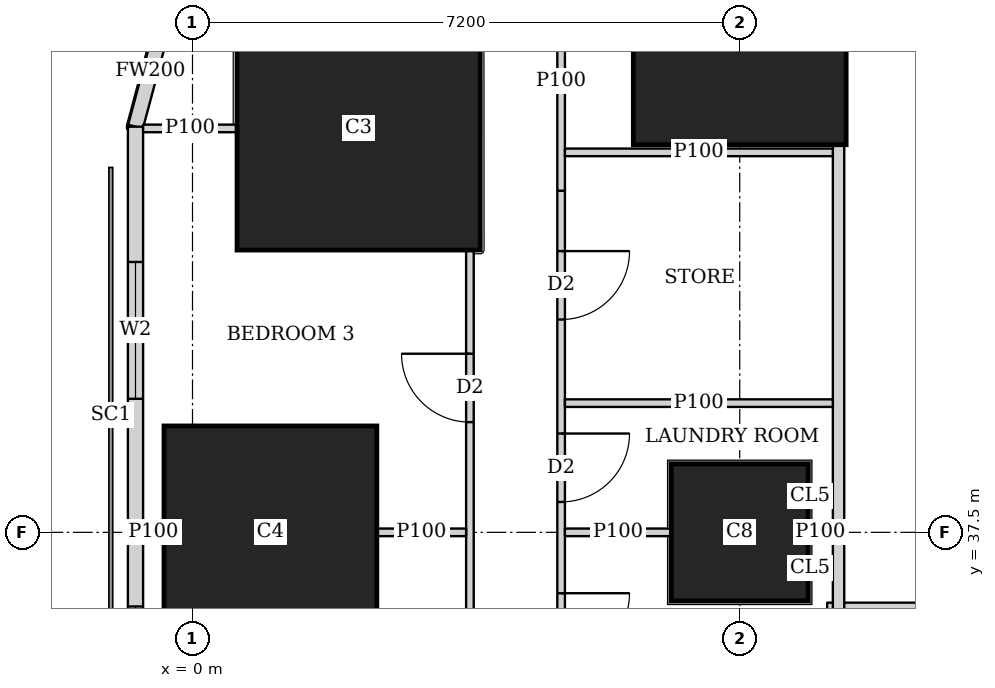
"""IFC4 building model, lengths in metres.
Left out: names, types, materials, properties, quantities, classifications, styles, units other than length and angle.
Written with IfcOpenShell. Run it as: python <this file> out.ifc"""

import sys

from ifc_helpers import new_model, si_unit, direction, frame, frame_2d, origin, origin_2d, place, context, subcontext, project, spatial, rectangle, extrude, element, fill, save


model = new_model("IFC4")
c1 = context("Model", 3, precision=1e-05, world=origin(), true_north=direction((0.0, 1.0)))
c2 = subcontext(c1, "Body", "Model", "MODEL_VIEW")
j1 = project(units=[si_unit("LENGTHUNIT", "METRE"), si_unit("PLANEANGLEUNIT", "RADIAN")], contexts=[c1])
p1 = place(None, origin())
s1 = spatial("IfcSite", under=j1, at=p1, CompositionType="ELEMENT")
p2 = place(p1, origin())
s2 = spatial("IfcBuilding", under=s1, at=p2, CompositionType="ELEMENT")
p3 = place(p2, frame((0.0, 0.0, 65.0)))
s3 = spatial("IfcBuildingStorey", under=s2, at=p3, CompositionType="ELEMENT", Elevation=65.0)
p4 = place(p3, frame((1.025, 37.5, 0.0), z_axis=(0.0, 0.0, 1.0), x_axis=(1.0, 0.0, 0.0)))
e1 = element("IfcColumn", 1, at=p4, inside=s3, PredefinedType="COLUMN", context=c2, shape_type="SweptSolid", body=[
    extrude(rectangle(XDim=2.8, YDim=2.8, at=origin_2d()), origin(), (0.0, 0.0, 1.0), 3.75),
])
p5 = place(p3, frame((7.2, 37.5, 0.0), z_axis=(0.0, 0.0, 1.0), x_axis=(1.0, 0.0, 0.0)))
e2 = element("IfcColumn", 2, at=p5, inside=s3, PredefinedType="COLUMN", context=c2, shape_type="SweptSolid", body=[
    extrude(rectangle(XDim=1.8, YDim=1.8, at=origin_2d()), origin(), (0.0, 0.0, 1.0), 3.75),
])
p6 = place(p3, frame((2.186, 42.814, 0.0), z_axis=(0.0, 0.0, 1.0), x_axis=(1.0, 0.0, 0.0)))
e3 = element("IfcColumn", 3, at=p6, inside=s3, PredefinedType="COLUMN", context=c2, shape_type="SweptSolid", body=[
    extrude(rectangle(XDim=3.2, YDim=3.2, at=origin_2d()), origin(), (0.0, 0.0, 1.0), 3.75),
])
p7 = place(p3, frame((7.2, 44.0, 0.0), z_axis=(0.0, 0.0, 1.0), x_axis=(1.0, 0.0, 0.0)))
e4 = element("IfcColumn", 4, at=p7, inside=s3, PredefinedType="COLUMN", context=c2, shape_type="SweptSolid", body=[
    extrude(rectangle(XDim=2.8, YDim=2.8, at=origin_2d()), origin(), (0.0, 0.0, 1.0), 3.75),
])
p8 = place(p3, frame((-0.358, 44.298, 0.0), z_axis=(0.0, 0.0, 1.0), x_axis=(-0.259168954497, -0.965832000415, 0.0)))
e5 = element("IfcWall", 5, at=p8, inside=s3, PredefinedType="SOLIDWALL", context=c2, shape_type="SweptSolid", body=[
    extrude(rectangle(XDim=1.513, YDim=0.2, at=frame_2d((0.756, 0.0))), origin(), (0.0, 0.0, 1.0), 3.5),
])
p9 = place(p3, frame((-0.75, 42.837, 0.0), z_axis=(0.0, 0.0, 1.0), x_axis=(0.0, -1.0, 0.0)))
e6 = element("IfcWall", 6, at=p9, inside=s3, PredefinedType="SOLIDWALL", context=c2, shape_type="SweptSolid", body=[
    extrude(rectangle(XDim=40.674, YDim=0.2, at=frame_2d((20.337, 0.0))), origin(), (0.0, 0.0, 1.0), 3.5),
])
p10 = place(p9, frame((1.78, 0.0, 0.9)))
e7 = element("IfcOpeningElement", 7, at=p10, cuts=e6, PredefinedType="OPENING", context=c2, shape_type="SweptSolid", body=[
    extrude(rectangle(XDim=1.8, YDim=1.5, at=frame_2d((0.9, 0.75))), frame((0.0, 0.11, 0.0), z_axis=(0.0, -1.0, 0.0), x_axis=(1.0, 0.0, 0.0)), (0.0, 0.0, 1.0), 0.22),
])
p11 = place(p9, frame((6.312, 0.0, 0.9)))
e8 = element("IfcOpeningElement", 8, at=p11, cuts=e6, PredefinedType="OPENING", context=c2, shape_type="SweptSolid", body=[
    extrude(rectangle(XDim=1.8, YDim=1.5, at=frame_2d((0.9, 0.75))), frame((0.0, 0.11, 0.0), z_axis=(0.0, -1.0, 0.0), x_axis=(1.0, 0.0, 0.0)), (0.0, 0.0, 1.0), 0.22),
])
p12 = place(p9, frame((10.062, 0.0, 0.9)))
e9 = element("IfcOpeningElement", 9, at=p12, cuts=e6, PredefinedType="OPENING", context=c2, shape_type="SweptSolid", body=[
    extrude(rectangle(XDim=1.8, YDim=1.5, at=frame_2d((0.9, 0.75))), frame((0.0, 0.11, 0.0), z_axis=(0.0, -1.0, 0.0), x_axis=(1.0, 0.0, 0.0)), (0.0, 0.0, 1.0), 0.22),
])
p13 = place(p9, frame((13.812, 0.0, 0.9)))
e10 = element("IfcOpeningElement", 10, at=p13, cuts=e6, PredefinedType="OPENING", context=c2, shape_type="SweptSolid", body=[
    extrude(rectangle(XDim=1.8, YDim=1.5, at=frame_2d((0.9, 0.75))), frame((0.0, 0.11, 0.0), z_axis=(0.0, -1.0, 0.0), x_axis=(1.0, 0.0, 0.0)), (0.0, 0.0, 1.0), 0.22),
])
p14 = place(p9, frame((17.562, 0.0, 0.9)))
e11 = element("IfcOpeningElement", 11, at=p14, cuts=e6, PredefinedType="OPENING", context=c2, shape_type="SweptSolid", body=[
    extrude(rectangle(XDim=1.8, YDim=1.5, at=frame_2d((0.9, 0.75))), frame((0.0, 0.11, 0.0), z_axis=(0.0, -1.0, 0.0), x_axis=(1.0, 0.0, 0.0)), (0.0, 0.0, 1.0), 0.22),
])
p15 = place(p9, frame((21.312, 0.0, 0.9)))
e12 = element("IfcOpeningElement", 12, at=p15, cuts=e6, PredefinedType="OPENING", context=c2, shape_type="SweptSolid", body=[
    extrude(rectangle(XDim=1.8, YDim=1.5, at=frame_2d((0.9, 0.75))), frame((0.0, 0.11, 0.0), z_axis=(0.0, -1.0, 0.0), x_axis=(1.0, 0.0, 0.0)), (0.0, 0.0, 1.0), 0.22),
])
p16 = place(p9, frame((25.062, 0.0, 0.9)))
e13 = element("IfcOpeningElement", 13, at=p16, cuts=e6, PredefinedType="OPENING", context=c2, shape_type="SweptSolid", body=[
    extrude(rectangle(XDim=1.8, YDim=1.5, at=frame_2d((0.9, 0.75))), frame((0.0, 0.11, 0.0), z_axis=(0.0, -1.0, 0.0), x_axis=(1.0, 0.0, 0.0)), (0.0, 0.0, 1.0), 0.22),
])
p17 = place(p9, frame((28.812, 0.0, 0.9)))
e14 = element("IfcOpeningElement", 14, at=p17, cuts=e6, PredefinedType="OPENING", context=c2, shape_type="SweptSolid", body=[
    extrude(rectangle(XDim=1.8, YDim=1.5, at=frame_2d((0.9, 0.75))), frame((0.0, 0.11, 0.0), z_axis=(0.0, -1.0, 0.0), x_axis=(1.0, 0.0, 0.0)), (0.0, 0.0, 1.0), 0.22),
])
p18 = place(p9, frame((32.562, 0.0, 0.9)))
e15 = element("IfcOpeningElement", 15, at=p18, cuts=e6, PredefinedType="OPENING", context=c2, shape_type="SweptSolid", body=[
    extrude(rectangle(XDim=1.8, YDim=1.5, at=frame_2d((0.9, 0.75))), frame((0.0, 0.11, 0.0), z_axis=(0.0, -1.0, 0.0), x_axis=(1.0, 0.0, 0.0)), (0.0, 0.0, 1.0), 0.22),
])
p19 = place(p9, frame((37.094, 0.0, 0.9)))
e16 = element("IfcOpeningElement", 16, at=p19, cuts=e6, PredefinedType="OPENING", context=c2, shape_type="SweptSolid", body=[
    extrude(rectangle(XDim=1.8, YDim=1.5, at=frame_2d((0.9, 0.75))), frame((0.0, 0.11, 0.0), z_axis=(0.0, -1.0, 0.0), x_axis=(1.0, 0.0, 0.0)), (0.0, 0.0, 1.0), 0.22),
])
p20 = place(p3, frame((8.5, 2.426, 0.0), z_axis=(0.0, 0.0, 1.0), x_axis=(0.0, 1.0, 0.0)))
e17 = element("IfcWall", 17, at=p20, inside=s3, PredefinedType="SOLIDWALL", context=c2, shape_type="SweptSolid", body=[
    extrude(rectangle(XDim=40.173, YDim=0.15, at=frame_2d((20.086, 0.0))), origin(), (0.0, 0.0, 1.0), 3.5),
])
p21 = place(p20, frame((6.661, 0.0, 0.0)))
e18 = element("IfcOpeningElement", 18, at=p21, cuts=e17, PredefinedType="OPENING", context=c2, shape_type="SweptSolid", body=[
    extrude(rectangle(XDim=1.0, YDim=2.1, at=frame_2d((0.5, 1.05))), frame((0.0, 0.085, 0.0), z_axis=(0.0, -1.0, 0.0), x_axis=(1.0, 0.0, 0.0)), (0.0, 0.0, 1.0), 0.17),
])
p22 = place(p20, frame((9.986, 0.0, 0.0)))
e19 = element("IfcOpeningElement", 19, at=p22, cuts=e17, PredefinedType="OPENING", context=c2, shape_type="SweptSolid", body=[
    extrude(rectangle(XDim=1.0, YDim=2.1, at=frame_2d((0.5, 1.05))), frame((0.0, 0.085, 0.0), z_axis=(0.0, -1.0, 0.0), x_axis=(1.0, 0.0, 0.0)), (0.0, 0.0, 1.0), 0.17),
])
p23 = place(p20, frame((17.487, 0.0, 0.0)))
e20 = element("IfcOpeningElement", 20, at=p23, cuts=e17, PredefinedType="OPENING", context=c2, shape_type="SweptSolid", body=[
    extrude(rectangle(XDim=1.0, YDim=2.1, at=frame_2d((0.5, 1.05))), frame((0.0, 0.085, 0.0), z_axis=(0.0, -1.0, 0.0), x_axis=(1.0, 0.0, 0.0)), (0.0, 0.0, 1.0), 0.17),
])
p24 = place(p20, frame((24.987, 0.0, 0.0)))
e21 = element("IfcOpeningElement", 21, at=p24, cuts=e17, PredefinedType="OPENING", context=c2, shape_type="SweptSolid", body=[
    extrude(rectangle(XDim=1.0, YDim=2.1, at=frame_2d((0.5, 1.05))), frame((0.0, 0.085, 0.0), z_axis=(0.0, -1.0, 0.0), x_axis=(1.0, 0.0, 0.0)), (0.0, 0.0, 1.0), 0.17),
])
p25 = place(p3, frame((8.35, 36.5, 0.0), z_axis=(0.0, 0.0, 1.0), x_axis=(1.0, 0.0, 0.0)))
e22 = element("IfcWall", 22, at=p25, inside=s3, PredefinedType="SOLIDWALL", context=c2, shape_type="SweptSolid", body=[
    extrude(rectangle(XDim=26.415, YDim=0.15, at=frame_2d((13.208, 0.0))), origin(), (0.0, 0.0, 1.0), 3.5),
])
p26 = place(p25, frame((2.6, 0.0, 0.0)))
e23 = element("IfcOpeningElement", 23, at=p26, cuts=e22, PredefinedType="OPENING", context=c2, shape_type="SweptSolid", body=[
    extrude(rectangle(XDim=1.0, YDim=2.1, at=frame_2d((0.5, 1.05))), frame((0.0, 0.085, 0.0), z_axis=(0.0, -1.0, 0.0), x_axis=(1.0, 0.0, 0.0)), (0.0, 0.0, 1.0), 0.17),
])
p27 = place(p25, frame((10.949, 0.0, 0.0)))
e24 = element("IfcOpeningElement", 24, at=p27, cuts=e22, PredefinedType="OPENING", context=c2, shape_type="SweptSolid", body=[
    extrude(rectangle(XDim=1.0, YDim=2.1, at=frame_2d((0.5, 1.05))), frame((0.0, 0.085, 0.0), z_axis=(0.0, -1.0, 0.0), x_axis=(1.0, 0.0, 0.0)), (0.0, 0.0, 1.0), 0.17),
])
p28 = place(p25, frame((18.149, 0.0, 0.0)))
e25 = element("IfcOpeningElement", 25, at=p28, cuts=e22, PredefinedType="OPENING", context=c2, shape_type="SweptSolid", body=[
    extrude(rectangle(XDim=1.0, YDim=2.1, at=frame_2d((0.5, 1.05))), frame((0.0, 0.085, 0.0), z_axis=(0.0, -1.0, 0.0), x_axis=(1.0, 0.0, 0.0)), (0.0, 0.0, 1.0), 0.17),
])
p29 = place(p3, frame((3.65, 30.0, 0.0), z_axis=(0.0, 0.0, 1.0), x_axis=(0.0, 1.0, 0.0)))
e26 = element("IfcWall", 26, at=p29, inside=s3, PredefinedType="PARTITIONING", context=c2, shape_type="SweptSolid", body=[
    extrude(rectangle(XDim=11.213, YDim=0.1, at=frame_2d((5.606, 0.0))), origin(), (0.0, 0.0, 1.0), 3.5),
])
p30 = place(p29, frame((1.45, 0.0, 0.0)))
e27 = element("IfcOpeningElement", 27, at=p30, cuts=e26, PredefinedType="OPENING", context=c2, shape_type="SweptSolid", body=[
    extrude(rectangle(XDim=0.9, YDim=2.1, at=frame_2d((0.45, 1.05))), frame((0.0, 0.06, 0.0), z_axis=(0.0, -1.0, 0.0), x_axis=(1.0, 0.0, 0.0)), (0.0, 0.0, 1.0), 0.12),
])
p31 = place(p29, frame((3.95, 0.0, 0.0)))
e28 = element("IfcOpeningElement", 28, at=p31, cuts=e26, PredefinedType="OPENING", context=c2, shape_type="SweptSolid", body=[
    extrude(rectangle(XDim=0.9, YDim=2.1, at=frame_2d((0.45, 1.05))), frame((0.0, 0.06, 0.0), z_axis=(0.0, -1.0, 0.0), x_axis=(1.0, 0.0, 0.0)), (0.0, 0.0, 1.0), 0.12),
])
p32 = place(p29, frame((8.95, 0.0, 0.0)))
e29 = element("IfcOpeningElement", 29, at=p32, cuts=e26, PredefinedType="OPENING", context=c2, shape_type="SweptSolid", body=[
    extrude(rectangle(XDim=0.9, YDim=2.1, at=frame_2d((0.45, 1.05))), frame((0.0, 0.06, 0.0), z_axis=(0.0, -1.0, 0.0), x_axis=(1.0, 0.0, 0.0)), (0.0, 0.0, 1.0), 0.12),
])
p33 = place(p3, frame((4.85, 30.0, 0.0), z_axis=(0.0, 0.0, 1.0), x_axis=(0.0, 1.0, 0.0)))
e30 = element("IfcWall", 30, at=p33, inside=s3, PredefinedType="PARTITIONING", context=c2, shape_type="SweptSolid", body=[
    extrude(rectangle(XDim=11.994, YDim=0.1, at=frame_2d((5.997, 0.0))), origin(), (0.0, 0.0, 1.0), 3.5),
])
p34 = place(p33, frame((0.575, 0.0, 0.0)))
e31 = element("IfcOpeningElement", 31, at=p34, cuts=e30, PredefinedType="OPENING", context=c2, shape_type="SweptSolid", body=[
    extrude(rectangle(XDim=0.9, YDim=2.1, at=frame_2d((0.45, 1.05))), frame((0.0, 0.06, 0.0), z_axis=(0.0, -1.0, 0.0), x_axis=(1.0, 0.0, 0.0)), (0.0, 0.0, 1.0), 0.12),
])
p35 = place(p33, frame((5.799, 0.0, 0.0)))
e32 = element("IfcOpeningElement", 32, at=p35, cuts=e30, PredefinedType="OPENING", context=c2, shape_type="SweptSolid", body=[
    extrude(rectangle(XDim=0.9, YDim=2.1, at=frame_2d((0.45, 1.05))), frame((0.0, 0.06, 0.0), z_axis=(0.0, -1.0, 0.0), x_axis=(1.0, 0.0, 0.0)), (0.0, 0.0, 1.0), 0.12),
])
p36 = place(p33, frame((7.9, 0.0, 0.0)))
e33 = element("IfcOpeningElement", 33, at=p36, cuts=e30, PredefinedType="OPENING", context=c2, shape_type="SweptSolid", body=[
    extrude(rectangle(XDim=0.9, YDim=2.1, at=frame_2d((0.45, 1.05))), frame((0.0, 0.06, 0.0), z_axis=(0.0, -1.0, 0.0), x_axis=(1.0, 0.0, 0.0)), (0.0, 0.0, 1.0), 0.12),
])
p37 = place(p33, frame((3.075, 0.0, 0.0)))
e34 = element("IfcOpeningElement", 34, at=p37, cuts=e30, PredefinedType="OPENING", context=c2, shape_type="SweptSolid", body=[
    extrude(rectangle(XDim=0.9, YDim=2.1, at=frame_2d((0.45, 1.05))), frame((0.0, 0.06, 0.0), z_axis=(0.0, -1.0, 0.0), x_axis=(1.0, 0.0, 0.0)), (0.0, 0.0, 1.0), 0.12),
])
p38 = place(p33, frame((10.3, 0.0, 0.0)))
e35 = element("IfcOpeningElement", 35, at=p38, cuts=e30, PredefinedType="OPENING", context=c2, shape_type="SweptSolid", body=[
    extrude(rectangle(XDim=0.9, YDim=2.1, at=frame_2d((0.45, 1.05))), frame((0.0, 0.06, 0.0), z_axis=(0.0, -1.0, 0.0), x_axis=(1.0, 0.0, 0.0)), (0.0, 0.0, 1.0), 0.12),
])
p39 = place(p3, frame((4.85, 41.994, 0.0), z_axis=(0.0, 0.0, 1.0), x_axis=(0.0, 1.0, 0.0)))
e36 = element("IfcWall", 36, at=p39, inside=s3, PredefinedType="PARTITIONING", context=c2, shape_type="SweptSolid", body=[
    extrude(rectangle(XDim=2.901, YDim=0.1, at=frame_2d((1.451, 0.0))), origin(), (0.0, 0.0, 1.0), 2.05),
])
p40 = place(p3, frame((-0.65, 37.5, 0.0), z_axis=(0.0, 0.0, 1.0), x_axis=(1.0, 0.0, 0.0)))
e37 = element("IfcWall", 37, at=p40, inside=s3, PredefinedType="PARTITIONING", context=c2, shape_type="SweptSolid", body=[
    extrude(rectangle(XDim=0.274, YDim=0.1, at=frame_2d((0.137, 0.0))), origin(), (0.0, 0.0, 1.0), 3.5),
])
p41 = place(p3, frame((2.426, 37.5, 0.0), z_axis=(0.0, 0.0, 1.0), x_axis=(1.0, 0.0, 0.0)))
e38 = element("IfcWall", 38, at=p41, inside=s3, PredefinedType="PARTITIONING", context=c2, shape_type="SweptSolid", body=[
    extrude(rectangle(XDim=1.174, YDim=0.1, at=frame_2d((0.587, 0.0))), origin(), (0.0, 0.0, 1.0), 2.05),
])
p42 = place(p3, frame((-0.65, 42.814, 0.0), z_axis=(0.0, 0.0, 1.0), x_axis=(1.0, 0.0, 0.0)))
e39 = element("IfcWall", 39, at=p42, inside=s3, PredefinedType="PARTITIONING", context=c2, shape_type="SweptSolid", body=[
    extrude(rectangle(XDim=1.235, YDim=0.1, at=frame_2d((0.617, 0.0))), origin(), (0.0, 0.0, 1.0), 3.5),
])
p43 = place(p3, frame((4.9, 37.5, 0.0), z_axis=(0.0, 0.0, 1.0), x_axis=(1.0, 0.0, 0.0)))
e40 = element("IfcWall", 40, at=p43, inside=s3, PredefinedType="PARTITIONING", context=c2, shape_type="SweptSolid", body=[
    extrude(rectangle(XDim=1.399, YDim=0.1, at=frame_2d((0.7, 0.0))), origin(), (0.0, 0.0, 1.0), 3.5),
])
p44 = place(p3, frame((8.101, 37.5, 0.0), z_axis=(0.0, 0.0, 1.0), x_axis=(1.0, 0.0, 0.0)))
e41 = element("IfcWall", 41, at=p44, inside=s3, PredefinedType="PARTITIONING", context=c2, shape_type="SweptSolid", body=[
    extrude(rectangle(XDim=0.324, YDim=0.1, at=frame_2d((0.162, 0.0))), origin(), (0.0, 0.0, 1.0), 3.5),
])
p45 = place(p3, frame((4.9, 42.499, 0.0), z_axis=(0.0, 0.0, 1.0), x_axis=(1.0, 0.0, 0.0)))
e42 = element("IfcWall", 42, at=p45, inside=s3, PredefinedType="PARTITIONING", context=c2, shape_type="SweptSolid", body=[
    extrude(rectangle(XDim=3.525, YDim=0.1, at=frame_2d((1.763, 0.0))), origin(), (0.0, 0.0, 1.0), 2.05),
])
p46 = place(p3, frame((4.9, 39.2, 0.0), z_axis=(0.0, 0.0, 1.0), x_axis=(1.0, 0.0, 0.0)))
e43 = element("IfcWall", 43, at=p46, inside=s3, PredefinedType="PARTITIONING", context=c2, shape_type="SweptSolid", body=[
    extrude(rectangle(XDim=3.525, YDim=0.1, at=frame_2d((1.763, 0.0))), origin(), (0.0, 0.0, 1.0), 3.5),
])
p47 = place(p10, origin())
e44 = element("IfcWindow", 44, at=p47, inside=s3, PartitioningType="SINGLE_PANEL", PredefinedType="WINDOW", context=c2, shape_type="SweptSolid", body=[
    extrude(rectangle(XDim=1.8, YDim=1.5, at=frame_2d((0.9, 0.75))), frame((0.0, 0.03, 0.0), z_axis=(0.0, -1.0, 0.0), x_axis=(1.0, 0.0, 0.0)), (0.0, 0.0, 1.0), 0.06),
])
fill(e7, e44)
p48 = place(p11, origin())
e45 = element("IfcWindow", 45, at=p48, inside=s3, PartitioningType="SINGLE_PANEL", PredefinedType="WINDOW", context=c2, shape_type="SweptSolid", body=[
    extrude(rectangle(XDim=1.8, YDim=1.5, at=frame_2d((0.9, 0.75))), frame((0.0, 0.03, 0.0), z_axis=(0.0, -1.0, 0.0), x_axis=(1.0, 0.0, 0.0)), (0.0, 0.0, 1.0), 0.06),
])
fill(e8, e45)
p49 = place(p32, origin())
e46 = element("IfcDoor", 46, at=p49, inside=s3, OperationType="SINGLE_SWING_RIGHT", PredefinedType="DOOR", context=c2, shape_type="SweptSolid", body=[
    extrude(rectangle(XDim=0.9, YDim=2.1, at=frame_2d((0.45, 1.05))), frame((0.0, 0.025, 0.0), z_axis=(0.0, -1.0, 0.0), x_axis=(1.0, 0.0, 0.0)), (0.0, 0.0, 1.0), 0.05),
])
fill(e29, e46)
p50 = place(p35, origin())
e47 = element("IfcDoor", 47, at=p50, inside=s3, OperationType="SINGLE_SWING_LEFT", PredefinedType="DOOR", context=c2, shape_type="SweptSolid", body=[
    extrude(rectangle(XDim=0.9, YDim=2.1, at=frame_2d((0.45, 1.05))), frame((0.0, 0.025, 0.0), z_axis=(0.0, -1.0, 0.0), x_axis=(1.0, 0.0, 0.0)), (0.0, 0.0, 1.0), 0.05),
])
fill(e32, e47)
p51 = place(p36, origin())
e48 = element("IfcDoor", 48, at=p51, inside=s3, OperationType="SINGLE_SWING_LEFT", PredefinedType="DOOR", context=c2, shape_type="SweptSolid", body=[
    extrude(rectangle(XDim=0.9, YDim=2.1, at=frame_2d((0.45, 1.05))), frame((0.0, 0.025, 0.0), z_axis=(0.0, -1.0, 0.0), x_axis=(1.0, 0.0, 0.0)), (0.0, 0.0, 1.0), 0.05),
])
fill(e33, e48)
p52 = place(p38, origin())
e49 = element("IfcDoor", 49, at=p52, inside=s3, OperationType="SINGLE_SWING_LEFT", PredefinedType="DOOR", context=c2, shape_type="SweptSolid", body=[
    extrude(rectangle(XDim=0.9, YDim=2.1, at=frame_2d((0.45, 1.05))), frame((0.0, 0.025, 0.0), z_axis=(0.0, -1.0, 0.0), x_axis=(1.0, 0.0, 0.0)), (0.0, 0.0, 1.0), 0.05),
])
fill(e35, e49)
save(model, sys.argv[1])
